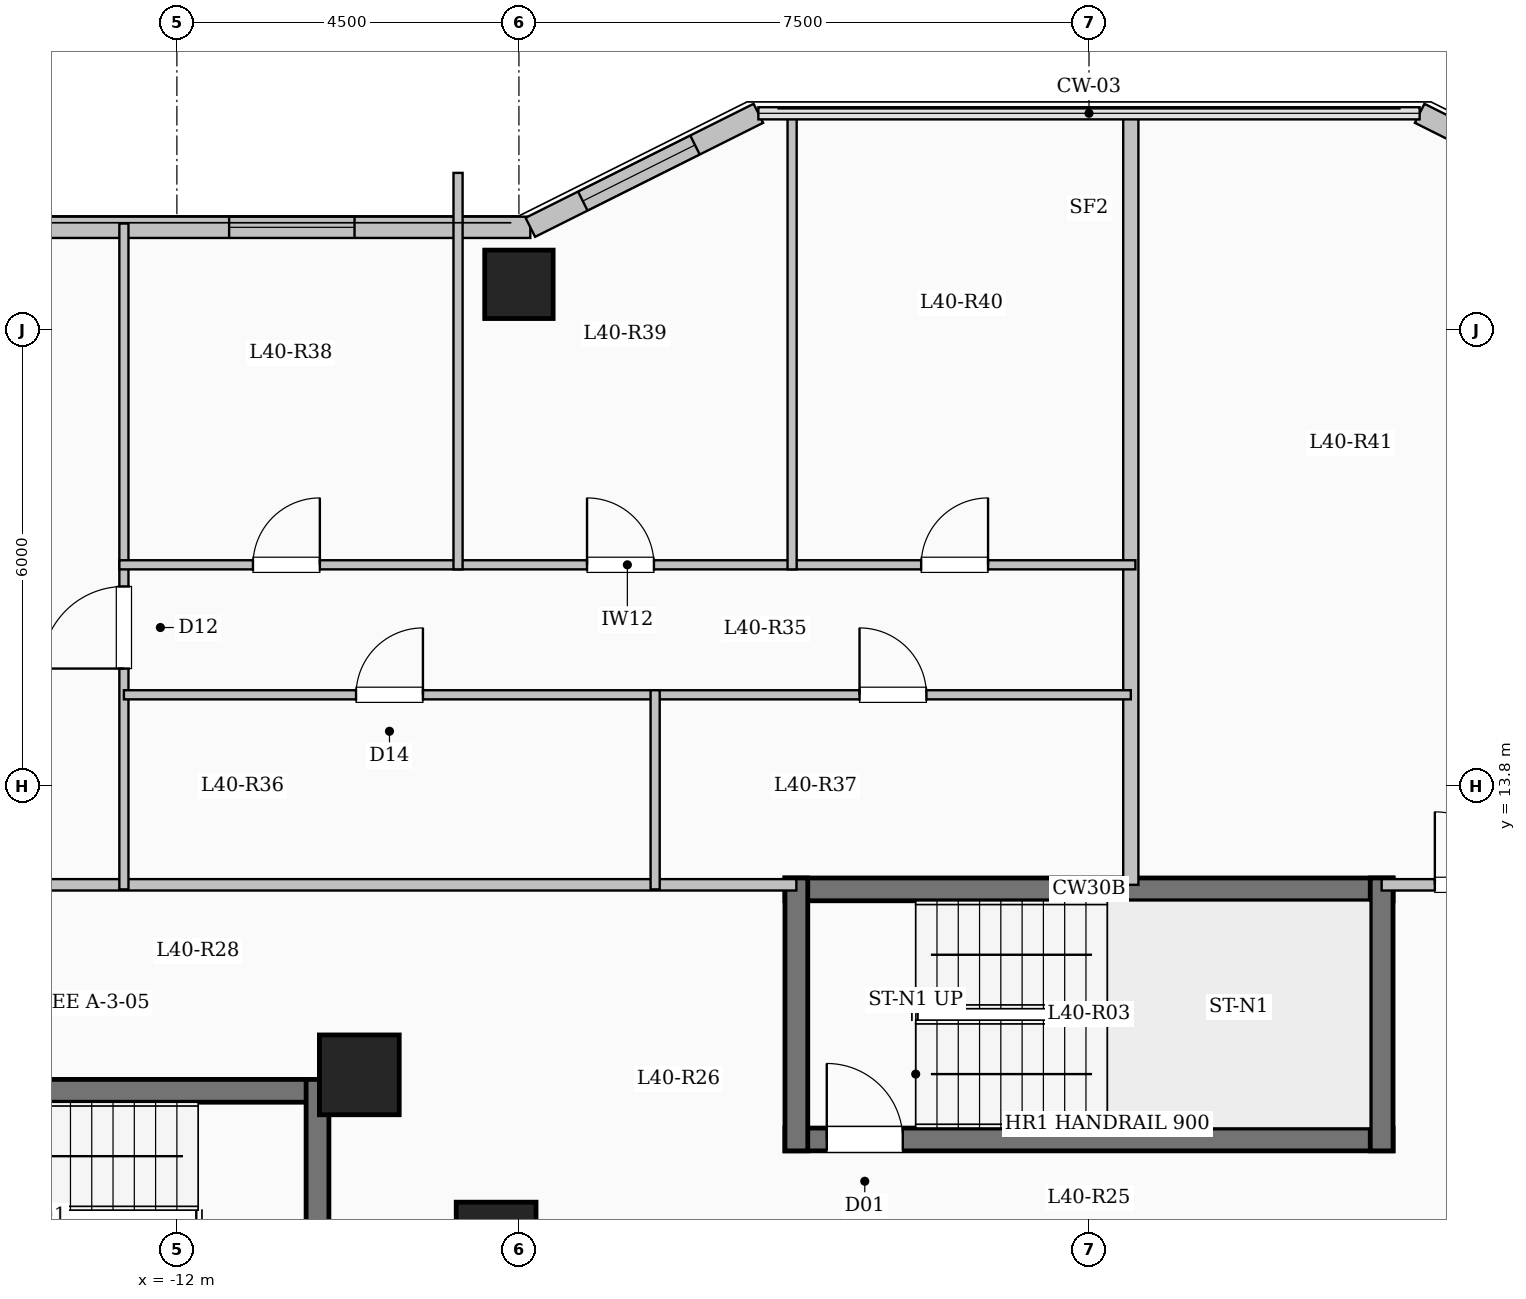
"""IFC4 building model, lengths in metres.
Left out: names, types, materials, properties, quantities, classifications, styles, units other than length and angle.
Written with IfcOpenShell. Run it as: python <this file> out.ifc"""

import sys

from ifc_helpers import new_model, si_unit, direction, frame, frame_2d, origin, origin_2d, place, context, subcontext, project, spatial, rectangle, extrude, element, fill, save


model = new_model("IFC4")
c1 = context("Model", 3, precision=1e-05, world=origin(), true_north=direction((0.0, 1.0)))
c2 = subcontext(c1, "Body", "Model", "MODEL_VIEW")
j1 = project(units=[si_unit("LENGTHUNIT", "METRE"), si_unit("PLANEANGLEUNIT", "RADIAN")], contexts=[c1])
p1 = place(None, origin())
s1 = spatial("IfcSite", under=j1, at=p1, CompositionType="ELEMENT")
p2 = place(p1, origin())
s2 = spatial("IfcBuilding", under=s1, at=p2, CompositionType="ELEMENT")
p3 = place(p2, frame((0.0, 0.0, 149.35)))
s3 = spatial("IfcBuildingStorey", under=s2, at=p3, CompositionType="ELEMENT", Elevation=149.35)
for number, where, z_axis, x_axis in (
    (1, (-7.8, 7.8, 0.0), (0.0, 0.0, 1.0), (1.0, 0.0, 0.0)),
    (2, (-9.6, 10.0, 0.0), (0.0, 0.0, 1.0), (1.0, 0.0, 0.0)),
):
    element("IfcColumn", number, at=place(p3, frame(where, z_axis=z_axis, x_axis=x_axis)), inside=s3, PredefinedType="COLUMN", context=c2, shape_type="SweptSolid", body=[
        extrude(rectangle(XDim=1.05, YDim=1.05, at=origin_2d()), origin(), (0.0, 0.0, 1.0), 3.35),
    ])
p4 = place(p3, frame((-7.5, 20.4, 0.0), z_axis=(0.0, 0.0, 1.0), x_axis=(1.0, 0.0, 0.0)))
e3 = element("IfcColumn", 3, at=p4, inside=s3, PredefinedType="COLUMN", context=c2, shape_type="SweptSolid", body=[
    extrude(rectangle(XDim=0.9, YDim=0.9, at=origin_2d()), origin(), (0.0, 0.0, 1.0), 3.35),
])
p5 = place(p3, frame((-19.65, 21.15, 0.0), z_axis=(0.0, 0.0, 1.0), x_axis=(1.0, 0.0, 0.0)))
e4 = element("IfcWall", 4, at=p5, inside=s3, PredefinedType="SOLIDWALL", context=c2, shape_type="SweptSolid", body=[
    extrude(rectangle(XDim=12.3, YDim=0.28, at=frame_2d((6.15, 0.0))), origin(), (0.0, 0.0, 1.0), 3.1),
])
p6 = place(p5, frame((2.414, 0.0, 0.9)))
e5 = element("IfcOpeningElement", 5, at=p6, cuts=e4, PredefinedType="OPENING", context=c2, shape_type="SweptSolid", body=[
    extrude(rectangle(XDim=2.2, YDim=1.75, at=frame_2d((1.1, 0.875))), frame((0.0, 0.15, 0.0), z_axis=(0.0, -1.0, 0.0), x_axis=(1.0, 0.0, 0.0)), (0.0, 0.0, 1.0), 0.3),
])
p7 = place(p5, frame((8.337, 0.0, 0.9)))
e6 = element("IfcOpeningElement", 6, at=p7, cuts=e4, PredefinedType="OPENING", context=c2, shape_type="SweptSolid", body=[
    extrude(rectangle(XDim=1.65, YDim=1.6, at=frame_2d((0.825, 0.8))), frame((0.0, 0.15, 0.0), z_axis=(0.0, -1.0, 0.0), x_axis=(1.0, 0.0, 0.0)), (0.0, 0.0, 1.0), 0.3),
])
p8 = place(p3, frame((-7.35, 21.15, 0.0), z_axis=(0.0, 0.0, 1.0), x_axis=(0.894427191, 0.4472135955, 0.0)))
e7 = element("IfcWall", 7, at=p8, inside=s3, PredefinedType="SOLIDWALL", context=c2, shape_type="SweptSolid", body=[
    extrude(rectangle(XDim=3.354, YDim=0.28, at=frame_2d((1.677, 0.0))), origin(), (0.0, 0.0, 1.0), 3.1),
])
p9 = place(p8, frame((0.772, 0.0, 0.9)))
e8 = element("IfcOpeningElement", 8, at=p9, cuts=e7, PredefinedType="OPENING", context=c2, shape_type="SweptSolid", body=[
    extrude(rectangle(XDim=1.65, YDim=1.6, at=frame_2d((0.825, 0.8))), frame((0.0, 0.15, 0.0), z_axis=(0.0, -1.0, 0.0), x_axis=(1.0, 0.0, 0.0)), (0.0, 0.0, 1.0), 0.3),
])
p10 = place(p3, frame((4.35, 22.65, 0.0), z_axis=(0.0, 0.0, 1.0), x_axis=(0.894427191, -0.4472135955, 0.0)))
e9 = element("IfcWall", 9, at=p10, inside=s3, PredefinedType="SOLIDWALL", context=c2, shape_type="SweptSolid", body=[
    extrude(rectangle(XDim=3.354, YDim=0.28, at=frame_2d((1.677, 0.0))), origin(), (0.0, 0.0, 1.0), 3.1),
])
p11 = place(p10, frame((1.653, 0.0, 0.95)))
e10 = element("IfcOpeningElement", 10, at=p11, cuts=e9, PredefinedType="OPENING", context=c2, shape_type="SweptSolid", body=[
    extrude(rectangle(XDim=1.2, YDim=1.5, at=frame_2d((0.6, 0.75))), frame((0.0, 0.15, 0.0), z_axis=(0.0, -1.0, 0.0), x_axis=(1.0, 0.0, 0.0)), (0.0, 0.0, 1.0), 0.3),
])
p12 = place(p3, frame((-18.0, 9.79, 0.0), z_axis=(0.0, 0.0, 1.0), x_axis=(1.0, 0.0, 0.0)))
e11 = element("IfcWall", 11, at=p12, inside=s3, PredefinedType="SHEAR", context=c2, shape_type="SweptSolid", body=[
    extrude(rectangle(XDim=8.0, YDim=0.3, at=frame_2d((4.0, 0.0))), origin(), (0.0, 0.0, 1.0), 3.35),
])
p13 = place(p3, frame((-10.15, 6.35, 0.0), z_axis=(0.0, 0.0, 1.0), x_axis=(0.0, 1.0, 0.0)))
e12 = element("IfcWall", 12, at=p13, inside=s3, PredefinedType="SHEAR", context=c2, shape_type="SweptSolid", body=[
    extrude(rectangle(XDim=3.59, YDim=0.3, at=frame_2d((1.795, 0.0))), origin(), (0.0, 0.0, 1.0), 3.35),
])
p14 = place(p3, frame((-4.0, 12.44, 0.0), z_axis=(0.0, 0.0, 1.0), x_axis=(1.0, 0.0, 0.0)))
e13 = element("IfcWall", 13, at=p14, inside=s3, PredefinedType="SHEAR", context=c2, shape_type="SweptSolid", body=[
    extrude(rectangle(XDim=8.0, YDim=0.3, at=frame_2d((4.0, 0.0))), origin(), (0.0, 0.0, 1.0), 3.35),
])
p15 = place(p3, frame((-4.0, 9.15, 0.0), z_axis=(0.0, 0.0, 1.0), x_axis=(1.0, 0.0, 0.0)))
e14 = element("IfcWall", 14, at=p15, inside=s3, PredefinedType="SHEAR", context=c2, shape_type="SweptSolid", body=[
    extrude(rectangle(XDim=8.0, YDim=0.3, at=frame_2d((4.0, 0.0))), origin(), (0.0, 0.0, 1.0), 3.35),
])
p16 = place(p15, frame((0.55, 0.0, 0.0)))
e15 = element("IfcOpeningElement", 15, at=p16, cuts=e14, PredefinedType="OPENING", context=c2, shape_type="SweptSolid", body=[
    extrude(rectangle(XDim=1.0, YDim=2.15, at=frame_2d((0.5, 1.075))), frame((0.0, 0.16, 0.0), z_axis=(0.0, -1.0, 0.0), x_axis=(1.0, 0.0, 0.0)), (0.0, 0.0, 1.0), 0.32),
])
for number, where, z_axis, x_axis in (
    (16, (-3.85, 9.0, 0.0), (0.0, 0.0, 1.0), (0.0, 1.0, 0.0)),
    (17, (3.85, 9.0, 0.0), (0.0, 0.0, 1.0), (0.0, 1.0, 0.0)),
):
    element("IfcWall", number, at=place(p3, frame(where, z_axis=z_axis, x_axis=x_axis)), inside=s3, PredefinedType="SHEAR", context=c2, shape_type="SweptSolid", body=[
        extrude(rectangle(XDim=3.59, YDim=0.3, at=frame_2d((1.795, 0.0))), origin(), (0.0, 0.0, 1.0), 3.35),
    ])
p17 = place(p3, frame((-19.55, 12.5, 0.0), z_axis=(0.0, 0.0, 1.0), x_axis=(1.0, 0.0, 0.0)))
e18 = element("IfcWall", 18, at=p17, inside=s3, PredefinedType="PARTITIONING", context=c2, shape_type="SweptSolid", body=[
    extrude(rectangle(XDim=15.7, YDim=0.15, at=frame_2d((7.85, 0.0))), origin(), (0.0, 0.0, 1.0), 3.1),
])
p18 = place(p17, frame((0.7, 0.0, 0.0)))
e19 = element("IfcOpeningElement", 19, at=p18, cuts=e18, PredefinedType="OPENING", context=c2, shape_type="SweptSolid", body=[
    extrude(rectangle(XDim=0.96, YDim=2.15, at=frame_2d((0.48, 1.075))), frame((0.0, 0.085, 0.0), z_axis=(0.0, -1.0, 0.0), x_axis=(1.0, 0.0, 0.0)), (0.0, 0.0, 1.0), 0.17),
])
p19 = place(p3, frame((3.85, 12.5, 0.0), z_axis=(0.0, 0.0, 1.0), x_axis=(1.0, 0.0, 0.0)))
e20 = element("IfcWall", 20, at=p19, inside=s3, PredefinedType="PARTITIONING", context=c2, shape_type="SweptSolid", body=[
    extrude(rectangle(XDim=15.7, YDim=0.15, at=frame_2d((7.85, 0.0))), origin(), (0.0, 0.0, 1.0), 3.1),
])
p20 = place(p19, frame((0.7, 0.0, 0.0)))
e21 = element("IfcOpeningElement", 21, at=p20, cuts=e20, PredefinedType="OPENING", context=c2, shape_type="SweptSolid", body=[
    extrude(rectangle(XDim=0.96, YDim=2.15, at=frame_2d((0.48, 1.075))), frame((0.0, 0.085, 0.0), z_axis=(0.0, -1.0, 0.0), x_axis=(1.0, 0.0, 0.0)), (0.0, 0.0, 1.0), 0.17),
])
p21 = place(p3, frame((0.55, 12.5, 0.0), z_axis=(0.0, 0.0, 1.0), x_axis=(0.0, 1.0, 0.0)))
e22 = element("IfcWall", 22, at=p21, inside=s3, PredefinedType="SOLIDWALL", context=c2, shape_type="SweptSolid", body=[
    extrude(rectangle(XDim=10.18, YDim=0.2, at=frame_2d((5.09, 0.0))), origin(), (0.0, 0.0, 1.0), 3.1),
])
p22 = place(p3, frame((-12.697, 12.44, 0.0), z_axis=(0.0, 0.0, 1.0), x_axis=(0.0, 1.0, 0.0)))
e23 = element("IfcWall", 23, at=p22, inside=s3, PredefinedType="PARTITIONING", context=c2, shape_type="SweptSolid", body=[
    extrude(rectangle(XDim=8.76, YDim=0.12, at=frame_2d((4.38, 0.0))), origin(), (0.0, 0.0, 1.0), 3.1),
])
p23 = place(p22, frame((2.905, 0.0, 0.0)))
e24 = element("IfcOpeningElement", 24, at=p23, cuts=e23, PredefinedType="OPENING", context=c2, shape_type="SweptSolid", body=[
    extrude(rectangle(XDim=1.08, YDim=2.15, at=frame_2d((0.54, 1.075))), frame((0.0, 0.07, 0.0), z_axis=(0.0, -1.0, 0.0), x_axis=(1.0, 0.0, 0.0)), (0.0, 0.0, 1.0), 0.14),
])
p24 = place(p3, frame((-12.697, 15.0, 0.0), z_axis=(0.0, 0.0, 1.0), x_axis=(1.0, 0.0, 0.0)))
e25 = element("IfcWall", 25, at=p24, inside=s3, PredefinedType="PARTITIONING", context=c2, shape_type="SweptSolid", body=[
    extrude(rectangle(XDim=6.989, YDim=0.12, at=frame_2d((3.495, 0.0))), origin(), (0.0, 0.0, 1.0), 3.1),
])
p25 = place(p24, frame((3.054, 0.0, 0.0)))
e26 = element("IfcOpeningElement", 26, at=p25, cuts=e25, PredefinedType="OPENING", context=c2, shape_type="SweptSolid", body=[
    extrude(rectangle(XDim=0.88, YDim=2.1, at=frame_2d((0.44, 1.05))), frame((0.0, 0.07, 0.0), z_axis=(0.0, -1.0, 0.0), x_axis=(1.0, 0.0, 0.0)), (0.0, 0.0, 1.0), 0.14),
])
p26 = place(p3, frame((-5.708, 15.0, 0.0), z_axis=(0.0, 0.0, 1.0), x_axis=(1.0, 0.0, 0.0)))
e27 = element("IfcWall", 27, at=p26, inside=s3, PredefinedType="PARTITIONING", context=c2, shape_type="SweptSolid", body=[
    extrude(rectangle(XDim=6.258, YDim=0.12, at=frame_2d((3.129, 0.0))), origin(), (0.0, 0.0, 1.0), 3.1),
])
p27 = place(p26, frame((2.689, 0.0, 0.0)))
e28 = element("IfcOpeningElement", 28, at=p27, cuts=e27, PredefinedType="OPENING", context=c2, shape_type="SweptSolid", body=[
    extrude(rectangle(XDim=0.88, YDim=2.1, at=frame_2d((0.44, 1.05))), frame((0.0, 0.07, 0.0), z_axis=(0.0, -1.0, 0.0), x_axis=(1.0, 0.0, 0.0)), (0.0, 0.0, 1.0), 0.14),
])
p28 = place(p3, frame((-12.757, 16.71, 0.0), z_axis=(0.0, 0.0, 1.0), x_axis=(1.0, 0.0, 0.0)))
e29 = element("IfcWall", 29, at=p28, inside=s3, PredefinedType="PARTITIONING", context=c2, shape_type="SweptSolid", body=[
    extrude(rectangle(XDim=13.367, YDim=0.12, at=frame_2d((6.684, 0.0))), origin(), (0.0, 0.0, 1.0), 3.1),
])
p29 = place(p28, frame((1.758, 0.0, 0.0)))
e30 = element("IfcOpeningElement", 30, at=p29, cuts=e29, PredefinedType="OPENING", context=c2, shape_type="SweptSolid", body=[
    extrude(rectangle(XDim=0.88, YDim=2.1, at=frame_2d((0.44, 1.05))), frame((0.0, 0.07, 0.0), z_axis=(0.0, -1.0, 0.0), x_axis=(1.0, 0.0, 0.0)), (0.0, 0.0, 1.0), 0.14),
])
p30 = place(p28, frame((6.153, 0.0, 0.0)))
e31 = element("IfcOpeningElement", 31, at=p30, cuts=e29, PredefinedType="OPENING", context=c2, shape_type="SweptSolid", body=[
    extrude(rectangle(XDim=0.88, YDim=2.1, at=frame_2d((0.44, 1.05))), frame((0.0, 0.07, 0.0), z_axis=(0.0, -1.0, 0.0), x_axis=(1.0, 0.0, 0.0)), (0.0, 0.0, 1.0), 0.14),
])
p31 = place(p28, frame((10.549, 0.0, 0.0)))
e32 = element("IfcOpeningElement", 32, at=p31, cuts=e29, PredefinedType="OPENING", context=c2, shape_type="SweptSolid", body=[
    extrude(rectangle(XDim=0.88, YDim=2.1, at=frame_2d((0.44, 1.05))), frame((0.0, 0.07, 0.0), z_axis=(0.0, -1.0, 0.0), x_axis=(1.0, 0.0, 0.0)), (0.0, 0.0, 1.0), 0.14),
])
p32 = place(p3, frame((-5.708, 12.44, 0.0), z_axis=(0.0, 0.0, 1.0), x_axis=(0.0, 1.0, 0.0)))
e33 = element("IfcWall", 33, at=p32, inside=s3, PredefinedType="PARTITIONING", context=c2, shape_type="SweptSolid", body=[
    extrude(rectangle(XDim=2.62, YDim=0.12, at=frame_2d((1.31, 0.0))), origin(), (0.0, 0.0, 1.0), 3.1),
])
p33 = place(p3, frame((-8.301, 16.65, 0.0), z_axis=(0.0, 0.0, 1.0), x_axis=(0.0, 1.0, 0.0)))
e34 = element("IfcWall", 34, at=p33, inside=s3, PredefinedType="PARTITIONING", context=c2, shape_type="SweptSolid", body=[
    extrude(rectangle(XDim=5.216, YDim=0.12, at=frame_2d((2.608, 0.0))), origin(), (0.0, 0.0, 1.0), 3.1),
])
p34 = place(p3, frame((-3.906, 16.65, 0.0), z_axis=(0.0, 0.0, 1.0), x_axis=(0.0, 1.0, 0.0)))
e35 = element("IfcWall", 35, at=p34, inside=s3, PredefinedType="PARTITIONING", context=c2, shape_type="SweptSolid", body=[
    extrude(rectangle(XDim=6.03, YDim=0.12, at=frame_2d((3.015, 0.0))), origin(), (0.0, 0.0, 1.0), 3.1),
])
p35 = place(p7, origin())
e36 = element("IfcWindow", 36, at=p35, inside=s3, PartitioningType="SINGLE_PANEL", PredefinedType="WINDOW", context=c2, shape_type="SweptSolid", body=[
    extrude(rectangle(XDim=1.65, YDim=1.6, at=frame_2d((0.825, 0.8))), frame((0.0, 0.03, 0.0), z_axis=(0.0, -1.0, 0.0), x_axis=(1.0, 0.0, 0.0)), (0.0, 0.0, 1.0), 0.06),
])
fill(e6, e36)
p36 = place(p9, origin())
e37 = element("IfcWindow", 37, at=p36, inside=s3, PartitioningType="SINGLE_PANEL", PredefinedType="WINDOW", context=c2, shape_type="SweptSolid", body=[
    extrude(rectangle(XDim=1.65, YDim=1.6, at=frame_2d((0.825, 0.8))), frame((0.0, 0.03, 0.0), z_axis=(0.0, -1.0, 0.0), x_axis=(1.0, 0.0, 0.0)), (0.0, 0.0, 1.0), 0.06),
])
fill(e8, e37)
p37 = place(p16, origin())
e38 = element("IfcDoor", 38, at=p37, inside=s3, OperationType="SINGLE_SWING_LEFT", PredefinedType="DOOR", context=c2, shape_type="SweptSolid", body=[
    extrude(rectangle(XDim=1.0, YDim=2.15, at=frame_2d((0.5, 1.075))), frame((0.0, 0.025, 0.0), z_axis=(0.0, -1.0, 0.0), x_axis=(1.0, 0.0, 0.0)), (0.0, 0.0, 1.0), 0.05),
])
fill(e15, e38)
p38 = place(p23, origin())
e39 = element("IfcDoor", 39, at=p38, inside=s3, OperationType="SINGLE_SWING_LEFT", PredefinedType="DOOR", context=c2, shape_type="SweptSolid", body=[
    extrude(rectangle(XDim=1.08, YDim=2.15, at=frame_2d((0.54, 1.075))), frame((0.0, 0.025, 0.0), z_axis=(0.0, -1.0, 0.0), x_axis=(1.0, 0.0, 0.0)), (0.0, 0.0, 1.0), 0.05),
])
fill(e24, e39)
p39 = place(p25, origin())
e40 = element("IfcDoor", 40, at=p39, inside=s3, OperationType="SINGLE_SWING_RIGHT", PredefinedType="DOOR", context=c2, shape_type="SweptSolid", body=[
    extrude(rectangle(XDim=0.88, YDim=2.1, at=frame_2d((0.44, 1.05))), frame((0.0, 0.025, 0.0), z_axis=(0.0, -1.0, 0.0), x_axis=(1.0, 0.0, 0.0)), (0.0, 0.0, 1.0), 0.05),
])
fill(e26, e40)
p40 = place(p27, origin())
e41 = element("IfcDoor", 41, at=p40, inside=s3, OperationType="SINGLE_SWING_LEFT", PredefinedType="DOOR", context=c2, shape_type="SweptSolid", body=[
    extrude(rectangle(XDim=0.88, YDim=2.1, at=frame_2d((0.44, 1.05))), frame((0.0, 0.025, 0.0), z_axis=(0.0, -1.0, 0.0), x_axis=(1.0, 0.0, 0.0)), (0.0, 0.0, 1.0), 0.05),
])
fill(e28, e41)
p41 = place(p29, origin())
e42 = element("IfcDoor", 42, at=p41, inside=s3, OperationType="SINGLE_SWING_RIGHT", PredefinedType="DOOR", context=c2, shape_type="SweptSolid", body=[
    extrude(rectangle(XDim=0.88, YDim=2.1, at=frame_2d((0.44, 1.05))), frame((0.0, 0.025, 0.0), z_axis=(0.0, -1.0, 0.0), x_axis=(1.0, 0.0, 0.0)), (0.0, 0.0, 1.0), 0.05),
])
fill(e30, e42)
p42 = place(p30, origin())
e43 = element("IfcDoor", 43, at=p42, inside=s3, OperationType="SINGLE_SWING_LEFT", PredefinedType="DOOR", context=c2, shape_type="SweptSolid", body=[
    extrude(rectangle(XDim=0.88, YDim=2.1, at=frame_2d((0.44, 1.05))), frame((0.0, 0.025, 0.0), z_axis=(0.0, -1.0, 0.0), x_axis=(1.0, 0.0, 0.0)), (0.0, 0.0, 1.0), 0.05),
])
fill(e31, e43)
p43 = place(p31, origin())
e44 = element("IfcDoor", 44, at=p43, inside=s3, OperationType="SINGLE_SWING_RIGHT", PredefinedType="DOOR", context=c2, shape_type="SweptSolid", body=[
    extrude(rectangle(XDim=0.88, YDim=2.1, at=frame_2d((0.44, 1.05))), frame((0.0, 0.025, 0.0), z_axis=(0.0, -1.0, 0.0), x_axis=(1.0, 0.0, 0.0)), (0.0, 0.0, 1.0), 0.05),
])
fill(e32, e44)
p44 = place(p20, origin())
e45 = element("IfcDoor", 45, at=p44, inside=s3, OperationType="SINGLE_SWING_LEFT", PredefinedType="DOOR", context=c2, shape_type="SweptSolid", body=[
    extrude(rectangle(XDim=0.96, YDim=2.15, at=frame_2d((0.48, 1.075))), frame((0.0, 0.025, 0.0), z_axis=(0.0, -1.0, 0.0), x_axis=(1.0, 0.0, 0.0)), (0.0, 0.0, 1.0), 0.05),
])
fill(e21, e45)
save(model, sys.argv[1])
